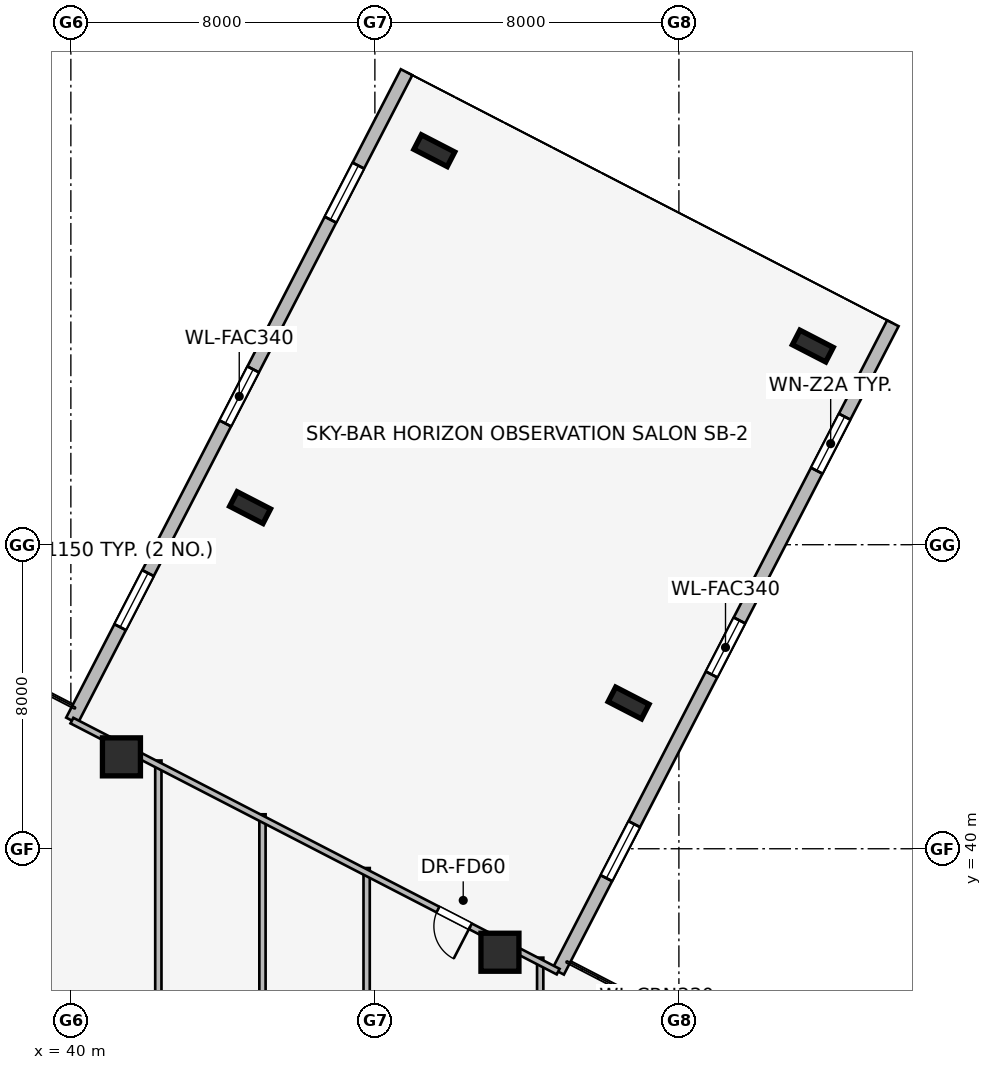
"""IFC4 building model, lengths in metres.
Left out: names, types, materials, properties, quantities, classifications, styles, units other than length and angle.
Written with IfcOpenShell. Run it as: python <this file> out.ifc"""

import sys

from ifc_helpers import new_model, si_unit, direction, frame, frame_2d, origin, origin_2d, place, context, subcontext, project, spatial, rectangle, i_section, extrude, element, fill, save


model = new_model("IFC4")
c1 = context("Model", 3, precision=1e-05, world=origin(), true_north=direction((0.0, 1.0)))
c2 = subcontext(c1, "Body", "Model", "MODEL_VIEW")
j1 = project(units=[si_unit("LENGTHUNIT", "METRE"), si_unit("PLANEANGLEUNIT", "RADIAN")], contexts=[c1])
p1 = place(None, origin())
s1 = spatial("IfcSite", under=j1, at=p1, CompositionType="ELEMENT")
p2 = place(p1, origin())
s2 = spatial("IfcBuilding", under=s1, at=p2, CompositionType="ELEMENT")
p3 = place(p2, frame((0.0, 0.0, 118.8)))
s3 = spatial("IfcBuildingStorey", under=s2, at=p3, CompositionType="ELEMENT", Elevation=118.8)
for number, where, z_axis, x_axis in (
    (1, (51.291, 37.277, 0.0), (0.0, 0.0, 1.0), (1.0, 0.0, 0.0)),
    (2, (41.331, 42.418, 0.0), (0.0, 0.0, 1.0), (1.0, 0.0, 0.0)),
):
    element("IfcColumn", number, at=place(p3, frame(where, z_axis=z_axis, x_axis=x_axis)), inside=s3, PredefinedType="COLUMN", context=c2, shape_type="SweptSolid", body=[
        extrude(rectangle(XDim=1.0, YDim=1.0, at=origin_2d()), origin(), (0.0, 0.0, 1.0), 3.45),
    ])
for number, where, z_axis, x_axis in (
    (3, (54.676, 43.835, 0.0), (0.0, 0.0, 1.0), (0.459, 0.889, 0.0)),
    (4, (44.716, 48.976, 0.0), (0.0, 0.0, 1.0), (0.459, 0.889, 0.0)),
    (5, (59.524, 53.227, 0.0), (0.0, 0.0, 1.0), (0.459, 0.889, 0.0)),
    (6, (49.564, 58.368, 0.0), (0.0, 0.0, 1.0), (0.459, 0.889, 0.0)),
):
    element("IfcColumn", number, at=place(p3, frame(where, z_axis=z_axis, x_axis=x_axis)), inside=s3, PredefinedType="COLUMN", context=c2, shape_type="SweptSolid", body=[
        extrude(i_section(OverallWidth=0.431, OverallDepth=0.987, WebThickness=0.034, FlangeThickness=0.062, at=origin_2d()), origin(), (0.0, 0.0, 1.0), 3.45),
    ])
p4 = place(p3, frame((61.63, 53.828, 0.0), z_axis=(0.0, 0.0, 1.0), x_axis=(-0.458697010696, -0.888592737073, 0.0)))
e7 = element("IfcWall", 7, at=p4, inside=s3, PredefinedType="STANDARD", context=c2, shape_type="SweptSolid", body=[
    extrude(rectangle(XDim=19.2, YDim=0.34, at=frame_2d((9.6, 0.0))), origin(), (0.0, 0.0, 1.0), 3.19),
])
p5 = place(p4, frame((2.767, 0.0, 0.75)))
e8 = element("IfcOpeningElement", 8, at=p5, cuts=e7, PredefinedType="OPENING", context=c2, shape_type="SweptSolid", body=[
    extrude(rectangle(XDim=1.6, YDim=1.55, at=frame_2d((0.8, 0.775))), frame((0.0, 0.18, 0.0), z_axis=(0.0, -1.0, 0.0), x_axis=(1.0, 0.0, 0.0)), (0.0, 0.0, 1.0), 0.36),
])
p6 = place(p4, frame((8.8, 0.0, 0.75)))
e9 = element("IfcOpeningElement", 9, at=p6, cuts=e7, PredefinedType="OPENING", context=c2, shape_type="SweptSolid", body=[
    extrude(rectangle(XDim=1.6, YDim=1.55, at=frame_2d((0.8, 0.775))), frame((0.0, 0.18, 0.0), z_axis=(0.0, -1.0, 0.0), x_axis=(1.0, 0.0, 0.0)), (0.0, 0.0, 1.0), 0.36),
])
p7 = place(p4, frame((14.833, 0.0, 0.75)))
e10 = element("IfcOpeningElement", 10, at=p7, cuts=e7, PredefinedType="OPENING", context=c2, shape_type="SweptSolid", body=[
    extrude(rectangle(XDim=1.6, YDim=1.55, at=frame_2d((0.8, 0.775))), frame((0.0, 0.18, 0.0), z_axis=(0.0, -1.0, 0.0), x_axis=(1.0, 0.0, 0.0)), (0.0, 0.0, 1.0), 0.36),
])
p8 = place(p3, frame((40.028, 43.372, 0.0), z_axis=(0.0, 0.0, 1.0), x_axis=(0.45865166523, 0.888616143215, 0.0)))
e11 = element("IfcWall", 11, at=p8, inside=s3, PredefinedType="STANDARD", context=c2, shape_type="SweptSolid", body=[
    extrude(rectangle(XDim=19.199, YDim=0.34, at=frame_2d((9.6, 0.0))), origin(), (0.0, 0.0, 1.0), 3.19),
])
p9 = place(p8, frame((2.767, 0.0, 0.75)))
e12 = element("IfcOpeningElement", 12, at=p9, cuts=e11, PredefinedType="OPENING", context=c2, shape_type="SweptSolid", body=[
    extrude(rectangle(XDim=1.6, YDim=1.55, at=frame_2d((0.8, 0.775))), frame((0.0, 0.18, 0.0), z_axis=(0.0, -1.0, 0.0), x_axis=(1.0, 0.0, 0.0)), (0.0, 0.0, 1.0), 0.36),
])
p10 = place(p8, frame((8.8, 0.0, 0.75)))
e13 = element("IfcOpeningElement", 13, at=p10, cuts=e11, PredefinedType="OPENING", context=c2, shape_type="SweptSolid", body=[
    extrude(rectangle(XDim=1.6, YDim=1.55, at=frame_2d((0.8, 0.775))), frame((0.0, 0.18, 0.0), z_axis=(0.0, -1.0, 0.0), x_axis=(1.0, 0.0, 0.0)), (0.0, 0.0, 1.0), 0.36),
])
p11 = place(p8, frame((14.833, 0.0, 0.75)))
e14 = element("IfcOpeningElement", 14, at=p11, cuts=e11, PredefinedType="OPENING", context=c2, shape_type="SweptSolid", body=[
    extrude(rectangle(XDim=1.6, YDim=1.55, at=frame_2d((0.8, 0.775))), frame((0.0, 0.18, 0.0), z_axis=(0.0, -1.0, 0.0), x_axis=(1.0, 0.0, 0.0)), (0.0, 0.0, 1.0), 0.36),
])
p12 = place(p3, frame((42.302, 31.97, 0.0), z_axis=(0.0, 0.0, 1.0), x_axis=(0.0, 1.0, 0.0)))
e15 = element("IfcWall", 15, at=p12, inside=s3, PredefinedType="PARTITIONING", context=c2, shape_type="SweptSolid", body=[
    extrude(rectangle(XDim=10.352, YDim=0.165, at=frame_2d((5.176, 0.0))), origin(), (0.0, 0.0, 1.0), 3.19),
])
p13 = place(p3, frame((45.042, 31.97, 0.0), z_axis=(0.0, 0.0, 1.0), x_axis=(0.0, 1.0, 0.0)))
e16 = element("IfcWall", 16, at=p13, inside=s3, PredefinedType="PARTITIONING", context=c2, shape_type="SweptSolid", body=[
    extrude(rectangle(XDim=8.937, YDim=0.165, at=frame_2d((4.469, 0.0))), origin(), (0.0, 0.0, 1.0), 3.19),
])
p14 = place(p3, frame((47.783, 31.97, 0.0), z_axis=(0.0, 0.0, 1.0), x_axis=(0.0, 1.0, 0.0)))
e17 = element("IfcWall", 17, at=p14, inside=s3, PredefinedType="PARTITIONING", context=c2, shape_type="SweptSolid", body=[
    extrude(rectangle(XDim=7.523, YDim=0.165, at=frame_2d((3.761, 0.0))), origin(), (0.0, 0.0, 1.0), 3.19),
])
p15 = place(p3, frame((52.35, 31.97, 0.0), z_axis=(0.0, 0.0, 1.0), x_axis=(0.0, 1.0, 0.0)))
e18 = element("IfcWall", 18, at=p15, inside=s3, PredefinedType="PARTITIONING", context=c2, shape_type="SweptSolid", body=[
    extrude(rectangle(XDim=5.165, YDim=0.165, at=frame_2d((2.583, 0.0))), origin(), (0.0, 0.0, 1.0), 3.19),
])
p16 = place(p3, frame((52.823, 36.767, 0.0), z_axis=(0.0, 0.0, 1.0), x_axis=(-0.888588109751, 0.458705974683, 0.0)))
e19 = element("IfcWall", 19, at=p16, inside=s3, PredefinedType="PARTITIONING", context=c2, shape_type="SweptSolid", body=[
    extrude(rectangle(XDim=14.399, YDim=0.165, at=frame_2d((7.2, 0.0))), origin(), (0.0, 0.0, 1.0), 2.562),
])
p17 = place(p16, frame((2.6, 0.0, 0.0)))
e20 = element("IfcOpeningElement", 20, at=p17, cuts=e19, PredefinedType="OPENING", context=c2, shape_type="SweptSolid", body=[
    extrude(rectangle(XDim=0.96, YDim=2.0, at=frame_2d((0.48, 1.0))), frame((0.0, 0.093, 0.0), z_axis=(0.0, -1.0, 0.0), x_axis=(1.0, 0.0, 0.0)), (0.0, 0.0, 1.0), 0.185),
])
p18 = place(p5, origin())
e21 = element("IfcWindow", 21, at=p18, inside=s3, PartitioningType="SINGLE_PANEL", PredefinedType="WINDOW", context=c2, shape_type="SweptSolid", body=[
    extrude(rectangle(XDim=1.6, YDim=1.55, at=frame_2d((0.8, 0.775))), frame((0.0, 0.03, 0.0), z_axis=(0.0, -1.0, 0.0), x_axis=(1.0, 0.0, 0.0)), (0.0, 0.0, 1.0), 0.06),
])
fill(e8, e21)
p19 = place(p6, origin())
e22 = element("IfcWindow", 22, at=p19, inside=s3, PartitioningType="SINGLE_PANEL", PredefinedType="WINDOW", context=c2, shape_type="SweptSolid", body=[
    extrude(rectangle(XDim=1.6, YDim=1.55, at=frame_2d((0.8, 0.775))), frame((0.0, 0.03, 0.0), z_axis=(0.0, -1.0, 0.0), x_axis=(1.0, 0.0, 0.0)), (0.0, 0.0, 1.0), 0.06),
])
fill(e9, e22)
p20 = place(p7, origin())
e23 = element("IfcWindow", 23, at=p20, inside=s3, PartitioningType="SINGLE_PANEL", PredefinedType="WINDOW", context=c2, shape_type="SweptSolid", body=[
    extrude(rectangle(XDim=1.6, YDim=1.55, at=frame_2d((0.8, 0.775))), frame((0.0, 0.03, 0.0), z_axis=(0.0, -1.0, 0.0), x_axis=(1.0, 0.0, 0.0)), (0.0, 0.0, 1.0), 0.06),
])
fill(e10, e23)
p21 = place(p9, origin())
e24 = element("IfcWindow", 24, at=p21, inside=s3, PartitioningType="SINGLE_PANEL", PredefinedType="WINDOW", context=c2, shape_type="SweptSolid", body=[
    extrude(rectangle(XDim=1.6, YDim=1.55, at=frame_2d((0.8, 0.775))), frame((0.0, 0.03, 0.0), z_axis=(0.0, -1.0, 0.0), x_axis=(1.0, 0.0, 0.0)), (0.0, 0.0, 1.0), 0.06),
])
fill(e12, e24)
p22 = place(p10, origin())
e25 = element("IfcWindow", 25, at=p22, inside=s3, PartitioningType="SINGLE_PANEL", PredefinedType="WINDOW", context=c2, shape_type="SweptSolid", body=[
    extrude(rectangle(XDim=1.6, YDim=1.55, at=frame_2d((0.8, 0.775))), frame((0.0, 0.03, 0.0), z_axis=(0.0, -1.0, 0.0), x_axis=(1.0, 0.0, 0.0)), (0.0, 0.0, 1.0), 0.06),
])
fill(e13, e25)
p23 = place(p11, origin())
e26 = element("IfcWindow", 26, at=p23, inside=s3, PartitioningType="SINGLE_PANEL", PredefinedType="WINDOW", context=c2, shape_type="SweptSolid", body=[
    extrude(rectangle(XDim=1.6, YDim=1.55, at=frame_2d((0.8, 0.775))), frame((0.0, 0.03, 0.0), z_axis=(0.0, -1.0, 0.0), x_axis=(1.0, 0.0, 0.0)), (0.0, 0.0, 1.0), 0.06),
])
fill(e14, e26)
p24 = place(p17, origin())
e27 = element("IfcDoor", 27, at=p24, inside=s3, OperationType="SINGLE_SWING_LEFT", PredefinedType="DOOR", context=c2, shape_type="SweptSolid", body=[
    extrude(rectangle(XDim=0.96, YDim=2.0, at=frame_2d((0.48, 1.0))), frame((0.0, 0.025, 0.0), z_axis=(0.0, -1.0, 0.0), x_axis=(1.0, 0.0, 0.0)), (0.0, 0.0, 1.0), 0.05),
])
fill(e20, e27)
save(model, sys.argv[1])
